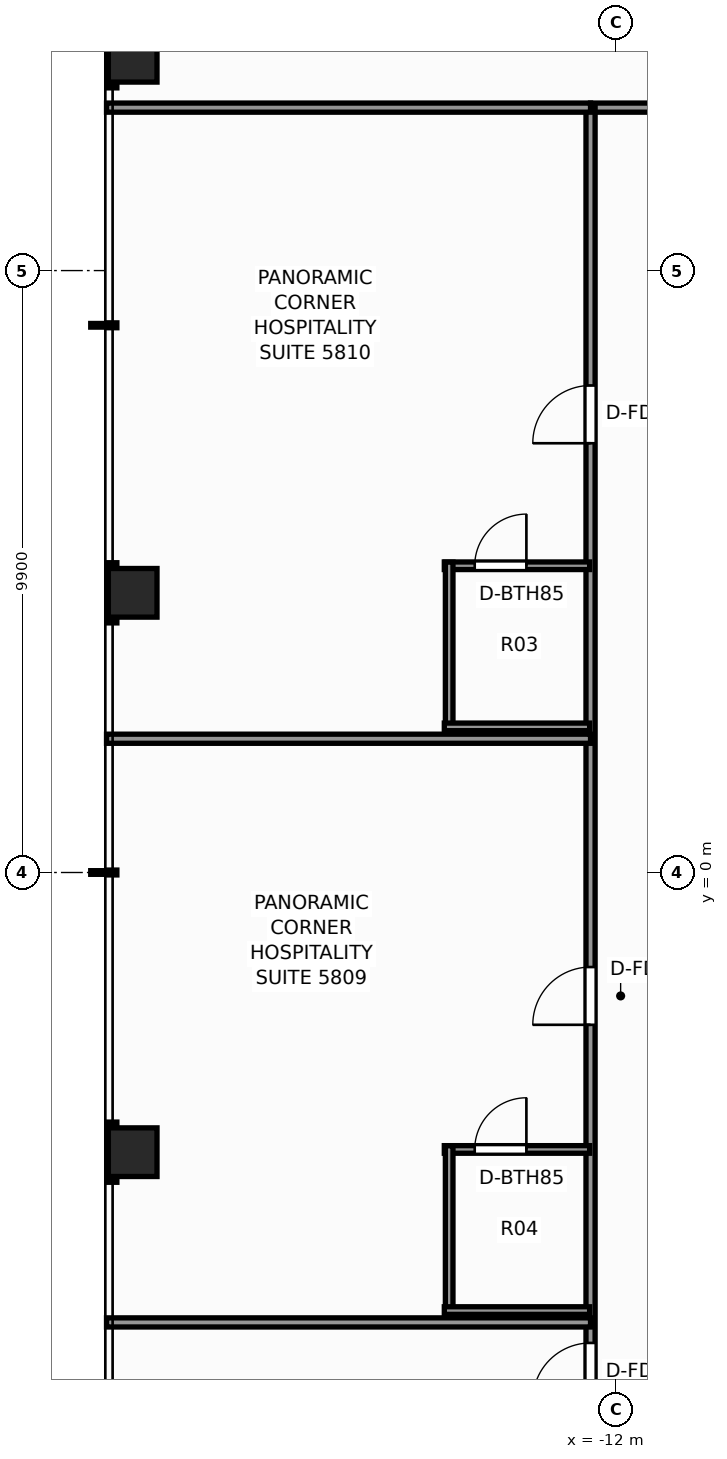
"""IFC4 building model, lengths in metres.
Left out: names, types, materials, properties, quantities, classifications, styles, units other than length and angle.
Written with IfcOpenShell. Run it as: python <this file> out.ifc"""

import sys

from ifc_helpers import new_model, si_unit, direction, frame, frame_2d, origin, origin_2d, place, context, subcontext, project, spatial, rectangle, extrude, element, fill, save


model = new_model("IFC4")
c1 = context("Model", 3, precision=1e-05, world=origin(), true_north=direction((0.0, 1.0)))
c2 = subcontext(c1, "Body", "Model", "MODEL_VIEW")
j1 = project(units=[si_unit("LENGTHUNIT", "METRE"), si_unit("PLANEANGLEUNIT", "RADIAN")], contexts=[c1])
p1 = place(None, origin())
s1 = spatial("IfcSite", under=j1, at=p1, CompositionType="ELEMENT")
p2 = place(p1, origin())
s2 = spatial("IfcBuilding", under=s1, at=p2, CompositionType="ELEMENT")
p3 = place(p2, frame((0.0, 0.0, 199.8)))
s3 = spatial("IfcBuildingStorey", under=s2, at=p3, CompositionType="ELEMENT", Elevation=199.8)
for number, where, z_axis, x_axis in (
    (1, (-19.95, -4.6, 0.0), (0.0, 0.0, 1.0), (1.0, 0.0, 0.0)),
    (2, (-19.95, 4.6, 0.0), (0.0, 0.0, 1.0), (1.0, 0.0, 0.0)),
    (3, (-19.95, 13.4, 0.0), (0.0, 0.0, 1.0), (1.0, 0.0, 0.0)),
):
    element("IfcColumn", number, at=place(p3, frame(where, z_axis=z_axis, x_axis=x_axis)), inside=s3, PredefinedType="COLUMN", context=c2, shape_type="SweptSolid", body=[
        extrude(rectangle(XDim=0.8, YDim=0.8, at=origin_2d()), origin(), (0.0, 0.0, 1.0), 3.3),
    ])
p4 = place(p3, frame((-12.42, 12.58, 0.0), z_axis=(0.0, 0.0, 1.0), x_axis=(1.0, 0.0, 0.0)))
e4 = element("IfcWall", 4, at=p4, inside=s3, PredefinedType="PARTITIONING", context=c2, shape_type="SweptSolid", body=[
    extrude(rectangle(XDim=24.84, YDim=0.15, at=frame_2d((12.42, 0.0))), origin(), (0.0, 0.0, 1.0), 2.369),
])
p5 = place(p4, frame((4.435, 0.0, 0.0)))
e5 = element("IfcOpeningElement", 5, at=p5, cuts=e4, PredefinedType="OPENING", context=c2, shape_type="SweptSolid", body=[
    extrude(rectangle(XDim=0.9, YDim=2.06, at=frame_2d((0.45, 1.03))), frame((0.0, 0.085, 0.0), z_axis=(0.0, -1.0, 0.0), x_axis=(1.0, 0.0, 0.0)), (0.0, 0.0, 1.0), 0.17),
])
p6 = place(p4, frame((19.505, 0.0, 0.0)))
e6 = element("IfcOpeningElement", 6, at=p6, cuts=e4, PredefinedType="OPENING", context=c2, shape_type="SweptSolid", body=[
    extrude(rectangle(XDim=0.9, YDim=2.06, at=frame_2d((0.45, 1.03))), frame((0.0, 0.085, 0.0), z_axis=(0.0, -1.0, 0.0), x_axis=(1.0, 0.0, 0.0)), (0.0, 0.0, 1.0), 0.17),
])
p7 = place(p3, frame((-12.42, -12.26, 0.0), z_axis=(0.0, 0.0, 1.0), x_axis=(0.0, 1.0, 0.0)))
e7 = element("IfcWall", 7, at=p7, inside=s3, PredefinedType="PARTITIONING", context=c2, shape_type="SweptSolid", body=[
    extrude(rectangle(XDim=24.84, YDim=0.15, at=frame_2d((12.42, 0.0))), origin(), (0.0, 0.0, 1.0), 2.369),
])
p8 = place(p7, frame((3.573, 0.0, 0.0)))
e8 = element("IfcOpeningElement", 8, at=p8, cuts=e7, PredefinedType="OPENING", context=c2, shape_type="SweptSolid", body=[
    extrude(rectangle(XDim=0.95, YDim=2.06, at=frame_2d((0.475, 1.03))), frame((0.0, 0.085, 0.0), z_axis=(0.0, -1.0, 0.0), x_axis=(1.0, 0.0, 0.0)), (0.0, 0.0, 1.0), 0.17),
])
p9 = place(p7, frame((9.755, 0.0, 0.0)))
e9 = element("IfcOpeningElement", 9, at=p9, cuts=e7, PredefinedType="OPENING", context=c2, shape_type="SweptSolid", body=[
    extrude(rectangle(XDim=0.95, YDim=2.06, at=frame_2d((0.475, 1.03))), frame((0.0, 0.085, 0.0), z_axis=(0.0, -1.0, 0.0), x_axis=(1.0, 0.0, 0.0)), (0.0, 0.0, 1.0), 0.17),
])
p10 = place(p7, frame((19.32, 0.0, 0.0)))
e10 = element("IfcOpeningElement", 10, at=p10, cuts=e7, PredefinedType="OPENING", context=c2, shape_type="SweptSolid", body=[
    extrude(rectangle(XDim=0.95, YDim=2.06, at=frame_2d((0.475, 1.03))), frame((0.0, 0.085, 0.0), z_axis=(0.0, -1.0, 0.0), x_axis=(1.0, 0.0, 0.0)), (0.0, 0.0, 1.0), 0.17),
])
p11 = place(p3, frame((-20.38, 12.58, 0.0), z_axis=(0.0, 0.0, 1.0), x_axis=(1.0, 0.0, 0.0)))
e11 = element("IfcWall", 11, at=p11, inside=s3, PredefinedType="PARTITIONING", context=c2, shape_type="SweptSolid", body=[
    extrude(rectangle(XDim=7.96, YDim=0.15, at=frame_2d((3.98, 0.0))), origin(), (0.0, 0.0, 1.0), 2.369),
])
for number, where, z_axis, x_axis in (
    (12, (-20.38, -7.4, 0.0), (0.0, 0.0, 1.0), (1.0, 0.0, 0.0)),
    (13, (-20.38, 2.2, 0.0), (0.0, 0.0, 1.0), (1.0, 0.0, 0.0)),
):
    element("IfcWall", number, at=place(p3, frame(where, z_axis=z_axis, x_axis=x_axis)), inside=s3, PredefinedType="PARTITIONING", context=c2, shape_type="SweptSolid", body=[
        extrude(rectangle(XDim=7.96, YDim=0.15, at=frame_2d((3.98, 0.0))), origin(), (0.0, 0.0, 1.0), 2.453),
    ])
p12 = place(p3, frame((-14.825, -4.555, 0.0), z_axis=(0.0, 0.0, 1.0), x_axis=(1.0, 0.0, 0.0)))
e14 = element("IfcWall", 14, at=p12, inside=s3, PredefinedType="PARTITIONING", context=c2, shape_type="SweptSolid", body=[
    extrude(rectangle(XDim=2.39, YDim=0.125, at=frame_2d((1.195, 0.0))), origin(), (0.0, 0.0, 1.0), 2.369),
])
p13 = place(p12, frame((0.5, 0.0, 0.0)))
e15 = element("IfcOpeningElement", 15, at=p13, cuts=e14, PredefinedType="OPENING", context=c2, shape_type="SweptSolid", body=[
    extrude(rectangle(XDim=0.85, YDim=2.03, at=frame_2d((0.425, 1.015))), frame((0.0, 0.073, 0.0), z_axis=(0.0, -1.0, 0.0), x_axis=(1.0, 0.0, 0.0)), (0.0, 0.0, 1.0), 0.145),
])
p14 = place(p3, frame((-14.745, -7.265, 0.0), z_axis=(0.0, 0.0, 1.0), x_axis=(0.0, 1.0, 0.0)))
e16 = element("IfcWall", 16, at=p14, inside=s3, PredefinedType="PARTITIONING", context=c2, shape_type="SweptSolid", body=[
    extrude(rectangle(XDim=2.77, YDim=0.125, at=frame_2d((1.385, 0.0))), origin(), (0.0, 0.0, 1.0), 2.369),
])
p15 = place(p3, frame((-14.825, -7.205, 0.0), z_axis=(0.0, 0.0, 1.0), x_axis=(1.0, 0.0, 0.0)))
e17 = element("IfcWall", 17, at=p15, inside=s3, PredefinedType="PARTITIONING", context=c2, shape_type="SweptSolid", body=[
    extrude(rectangle(XDim=2.39, YDim=0.125, at=frame_2d((1.195, 0.0))), origin(), (0.0, 0.0, 1.0), 3.08),
])
p16 = place(p3, frame((-14.825, 5.045, 0.0), z_axis=(0.0, 0.0, 1.0), x_axis=(1.0, 0.0, 0.0)))
e18 = element("IfcWall", 18, at=p16, inside=s3, PredefinedType="PARTITIONING", context=c2, shape_type="SweptSolid", body=[
    extrude(rectangle(XDim=2.39, YDim=0.125, at=frame_2d((1.195, 0.0))), origin(), (0.0, 0.0, 1.0), 3.08),
])
p17 = place(p16, frame((0.5, 0.0, 0.0)))
e19 = element("IfcOpeningElement", 19, at=p17, cuts=e18, PredefinedType="OPENING", context=c2, shape_type="SweptSolid", body=[
    extrude(rectangle(XDim=0.85, YDim=2.03, at=frame_2d((0.425, 1.015))), frame((0.0, 0.073, 0.0), z_axis=(0.0, -1.0, 0.0), x_axis=(1.0, 0.0, 0.0)), (0.0, 0.0, 1.0), 0.145),
])
p18 = place(p3, frame((-14.745, 2.335, 0.0), z_axis=(0.0, 0.0, 1.0), x_axis=(0.0, 1.0, 0.0)))
e20 = element("IfcWall", 20, at=p18, inside=s3, PredefinedType="PARTITIONING", context=c2, shape_type="SweptSolid", body=[
    extrude(rectangle(XDim=2.77, YDim=0.125, at=frame_2d((1.385, 0.0))), origin(), (0.0, 0.0, 1.0), 2.369),
])
p19 = place(p3, frame((-14.825, 2.395, 0.0), z_axis=(0.0, 0.0, 1.0), x_axis=(1.0, 0.0, 0.0)))
e21 = element("IfcWall", 21, at=p19, inside=s3, PredefinedType="PARTITIONING", context=c2, shape_type="SweptSolid", body=[
    extrude(rectangle(XDim=2.39, YDim=0.125, at=frame_2d((1.195, 0.0))), origin(), (0.0, 0.0, 1.0), 3.08),
])
p20 = place(p8, origin())
e22 = element("IfcDoor", 22, at=p20, inside=s3, OperationType="SINGLE_SWING_LEFT", PredefinedType="DOOR", context=c2, shape_type="SweptSolid", body=[
    extrude(rectangle(XDim=0.95, YDim=2.06, at=frame_2d((0.475, 1.03))), frame((0.0, 0.025, 0.0), z_axis=(0.0, -1.0, 0.0), x_axis=(1.0, 0.0, 0.0)), (0.0, 0.0, 1.0), 0.05),
])
fill(e8, e22)
p21 = place(p13, origin())
e23 = element("IfcDoor", 23, at=p21, inside=s3, OperationType="SINGLE_SWING_RIGHT", PredefinedType="DOOR", context=c2, shape_type="SweptSolid", body=[
    extrude(rectangle(XDim=0.85, YDim=2.03, at=frame_2d((0.425, 1.015))), frame((0.0, 0.025, 0.0), z_axis=(0.0, -1.0, 0.0), x_axis=(1.0, 0.0, 0.0)), (0.0, 0.0, 1.0), 0.05),
])
fill(e15, e23)
p22 = place(p9, origin())
e24 = element("IfcDoor", 24, at=p22, inside=s3, OperationType="SINGLE_SWING_LEFT", PredefinedType="DOOR", context=c2, shape_type="SweptSolid", body=[
    extrude(rectangle(XDim=0.95, YDim=2.06, at=frame_2d((0.475, 1.03))), frame((0.0, 0.025, 0.0), z_axis=(0.0, -1.0, 0.0), x_axis=(1.0, 0.0, 0.0)), (0.0, 0.0, 1.0), 0.05),
])
fill(e9, e24)
p23 = place(p17, origin())
e25 = element("IfcDoor", 25, at=p23, inside=s3, OperationType="SINGLE_SWING_RIGHT", PredefinedType="DOOR", context=c2, shape_type="SweptSolid", body=[
    extrude(rectangle(XDim=0.85, YDim=2.03, at=frame_2d((0.425, 1.015))), frame((0.0, 0.025, 0.0), z_axis=(0.0, -1.0, 0.0), x_axis=(1.0, 0.0, 0.0)), (0.0, 0.0, 1.0), 0.05),
])
fill(e19, e25)
p24 = place(p10, origin())
e26 = element("IfcDoor", 26, at=p24, inside=s3, OperationType="SINGLE_SWING_LEFT", PredefinedType="DOOR", context=c2, shape_type="SweptSolid", body=[
    extrude(rectangle(XDim=0.95, YDim=2.06, at=frame_2d((0.475, 1.03))), frame((0.0, 0.025, 0.0), z_axis=(0.0, -1.0, 0.0), x_axis=(1.0, 0.0, 0.0)), (0.0, 0.0, 1.0), 0.05),
])
fill(e10, e26)
save(model, sys.argv[1])
